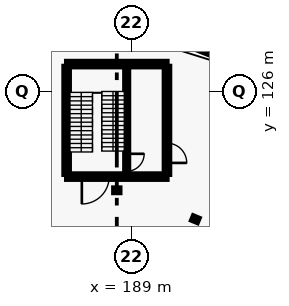
"""IFC4 building model, lengths in metres.
Left out: names, types, materials, properties, quantities, classifications, styles, units other than length and angle.
Written with IfcOpenShell. Run it as: python <this file> out.ifc"""

import sys

from ifc_helpers import new_model, si_unit, direction, frame, frame_2d, origin, origin_2d, place, context, subcontext, project, spatial, rectangle, i_section, extrude, element, fill, save


model = new_model("IFC4")
c1 = context("Model", 3, precision=1e-05, world=origin(), true_north=direction((0.0, 1.0)))
c2 = subcontext(c1, "Body", "Model", "MODEL_VIEW")
j1 = project(units=[si_unit("LENGTHUNIT", "METRE"), si_unit("PLANEANGLEUNIT", "RADIAN")], contexts=[c1])
p1 = place(None, origin())
s1 = spatial("IfcSite", under=j1, at=p1, CompositionType="ELEMENT")
p2 = place(p1, origin())
s2 = spatial("IfcBuilding", under=s1, at=p2, CompositionType="ELEMENT")
p3 = place(p2, origin())
s3 = spatial("IfcBuildingStorey", under=s2, at=p3, CompositionType="ELEMENT", Elevation=0.0)
for number, where, z_axis, x_axis in (
    (1, (193.166, 117.597, 0.0), (0.0, 0.0, 1.0), (0.383, 0.924, 0.0)),
    (2, (188.0, 119.5, 0.0), (0.0, 0.0, 1.0), (0.0, 1.0, 0.0)),
):
    element("IfcColumn", number, at=place(p3, frame(where, z_axis=z_axis, x_axis=x_axis)), inside=s3, PredefinedType="COLUMN", context=c2, shape_type="SweptSolid", body=[
        extrude(i_section(OverallWidth=0.3, OverallDepth=0.4, WebThickness=0.013, FlangeThickness=0.024, FilletRadius=0.027, at=origin_2d()), origin(), (0.0, 0.0, 1.0), 5.4),
    ])
p4 = place(p3, frame((194.513, 128.48, 0.0), z_axis=(0.0, 0.0, 1.0), x_axis=(-0.930141762333, 0.367200629035, 0.0)))
e3 = element("IfcWall", 3, at=p4, inside=s3, PredefinedType="SOLIDWALL", context=c2, shape_type="SweptSolid", body=[
    extrude(rectangle(XDim=2.282, YDim=0.44, at=frame_2d((1.141, 0.0))), origin(), (0.0, 0.0, 1.0), 4.7),
])
p5 = place(p4, frame((0.391, 0.0, 0.95)))
e4 = element("IfcOpeningElement", 4, at=p5, cuts=e3, PredefinedType="OPENING", context=c2, shape_type="SweptSolid", body=[
    extrude(rectangle(XDim=1.5, YDim=1.8, at=frame_2d((0.75, 0.9))), frame((0.0, 0.23, 0.0), z_axis=(0.0, -1.0, 0.0), x_axis=(1.0, 0.0, 0.0)), (0.0, 0.0, 1.0), 0.46),
])
p6 = place(p3, frame((184.7, 120.4, 0.0), z_axis=(0.0, 0.0, 1.0), x_axis=(1.0, 0.0, 0.0)))
e5 = element("IfcWall", 5, at=p6, inside=s3, PredefinedType="SHEAR", context=c2, shape_type="SweptSolid", body=[
    extrude(rectangle(XDim=6.6, YDim=0.35, at=frame_2d((3.3, 0.0))), origin(), (0.0, 0.0, 1.0), 5.4),
])
p7 = place(p6, frame((1.0, 0.0, 0.0)))
e6 = element("IfcOpeningElement", 6, at=p7, cuts=e5, PredefinedType="OPENING", context=c2, shape_type="SweptSolid", body=[
    extrude(rectangle(XDim=1.8, YDim=2.15, at=frame_2d((0.9, 1.075))), frame((0.0, 0.185, 0.0), z_axis=(0.0, -1.0, 0.0), x_axis=(1.0, 0.0, 0.0)), (0.0, 0.0, 1.0), 0.37),
])
p8 = place(p3, frame((184.7, 127.8, 0.0), z_axis=(0.0, 0.0, 1.0), x_axis=(1.0, 0.0, 0.0)))
e7 = element("IfcWall", 7, at=p8, inside=s3, PredefinedType="SHEAR", context=c2, shape_type="SweptSolid", body=[
    extrude(rectangle(XDim=6.6, YDim=0.35, at=frame_2d((3.3, 0.0))), origin(), (0.0, 0.0, 1.0), 5.4),
])
p9 = place(p3, frame((184.7, 120.55, 0.0), z_axis=(0.0, 0.0, 1.0), x_axis=(0.0, 1.0, 0.0)))
e8 = element("IfcWall", 8, at=p9, inside=s3, PredefinedType="SHEAR", context=c2, shape_type="SweptSolid", body=[
    extrude(rectangle(XDim=7.1, YDim=0.35, at=frame_2d((3.55, 0.0))), origin(), (0.0, 0.0, 1.0), 5.4),
])
p10 = place(p3, frame((191.3, 120.55, 0.0), z_axis=(0.0, 0.0, 1.0), x_axis=(0.0, 1.0, 0.0)))
e9 = element("IfcWall", 9, at=p10, inside=s3, PredefinedType="SHEAR", context=c2, shape_type="SweptSolid", body=[
    extrude(rectangle(XDim=7.1, YDim=0.35, at=frame_2d((3.55, 0.0))), origin(), (0.0, 0.0, 1.0), 5.4),
])
p11 = place(p10, frame((0.75, 0.0, 0.0)))
e10 = element("IfcOpeningElement", 10, at=p11, cuts=e9, PredefinedType="OPENING", context=c2, shape_type="SweptSolid", body=[
    extrude(rectangle(XDim=1.3, YDim=2.15, at=frame_2d((0.65, 1.075))), frame((0.0, 0.185, 0.0), z_axis=(0.0, -1.0, 0.0), x_axis=(1.0, 0.0, 0.0)), (0.0, 0.0, 1.0), 0.37),
])
p12 = place(p3, frame((188.65, 120.55, 0.0), z_axis=(0.0, 0.0, 1.0), x_axis=(0.0, 1.0, 0.0)))
e11 = element("IfcWall", 11, at=p12, inside=s3, PredefinedType="SHEAR", context=c2, shape_type="SweptSolid", body=[
    extrude(rectangle(XDim=7.1, YDim=0.25, at=frame_2d((3.55, 0.0))), origin(), (0.0, 0.0, 1.0), 5.4),
])
p13 = place(p12, frame((0.2, 0.0, 0.0)))
e12 = element("IfcOpeningElement", 12, at=p13, cuts=e11, PredefinedType="OPENING", context=c2, shape_type="SweptSolid", body=[
    extrude(rectangle(XDim=1.15, YDim=2.15, at=frame_2d((0.575, 1.075))), frame((0.0, 0.135, 0.0), z_axis=(0.0, -1.0, 0.0), x_axis=(1.0, 0.0, 0.0)), (0.0, 0.0, 1.0), 0.27),
])
p14 = place(p5, origin())
e13 = element("IfcWindow", 13, at=p14, inside=s3, PartitioningType="SINGLE_PANEL", PredefinedType="WINDOW", context=c2, shape_type="SweptSolid", body=[
    extrude(rectangle(XDim=1.5, YDim=1.8, at=frame_2d((0.75, 0.9))), frame((0.0, 0.03, 0.0), z_axis=(0.0, -1.0, 0.0), x_axis=(1.0, 0.0, 0.0)), (0.0, 0.0, 1.0), 0.06),
])
fill(e4, e13)
p15 = place(p11, frame((1.3, 0.0, 0.0), z_axis=(0.0, 0.0, 1.0), x_axis=(-1.0, 0.0, 0.0)))
e14 = element("IfcDoor", 14, at=p15, inside=s3, OperationType="DOUBLE_DOOR_SINGLE_SWING", PredefinedType="DOOR", context=c2, shape_type="SweptSolid", body=[
    extrude(rectangle(XDim=1.3, YDim=2.15, at=frame_2d((0.65, 1.075))), frame((0.0, 0.025, 0.0), z_axis=(0.0, -1.0, 0.0), x_axis=(1.0, 0.0, 0.0)), (0.0, 0.0, 1.0), 0.05),
])
fill(e10, e14)
p16 = place(p13, origin())
e15 = element("IfcDoor", 15, at=p16, inside=s3, OperationType="SINGLE_SWING_RIGHT", PredefinedType="DOOR", context=c2, shape_type="SweptSolid", body=[
    extrude(rectangle(XDim=1.15, YDim=2.15, at=frame_2d((0.575, 1.075))), frame((0.0, 0.025, 0.0), z_axis=(0.0, -1.0, 0.0), x_axis=(1.0, 0.0, 0.0)), (0.0, 0.0, 1.0), 0.05),
])
fill(e12, e15)
p17 = place(p7, frame((1.8, 0.0, 0.0), z_axis=(0.0, 0.0, 1.0), x_axis=(-1.0, 0.0, 0.0)))
e16 = element("IfcDoor", 16, at=p17, inside=s3, OperationType="DOUBLE_DOOR_SINGLE_SWING", PredefinedType="DOOR", context=c2, shape_type="SweptSolid", body=[
    extrude(rectangle(XDim=1.8, YDim=2.15, at=frame_2d((0.9, 1.075))), frame((0.0, 0.025, 0.0), z_axis=(0.0, -1.0, 0.0), x_axis=(1.0, 0.0, 0.0)), (0.0, 0.0, 1.0), 0.05),
])
fill(e6, e16)
save(model, sys.argv[1])
